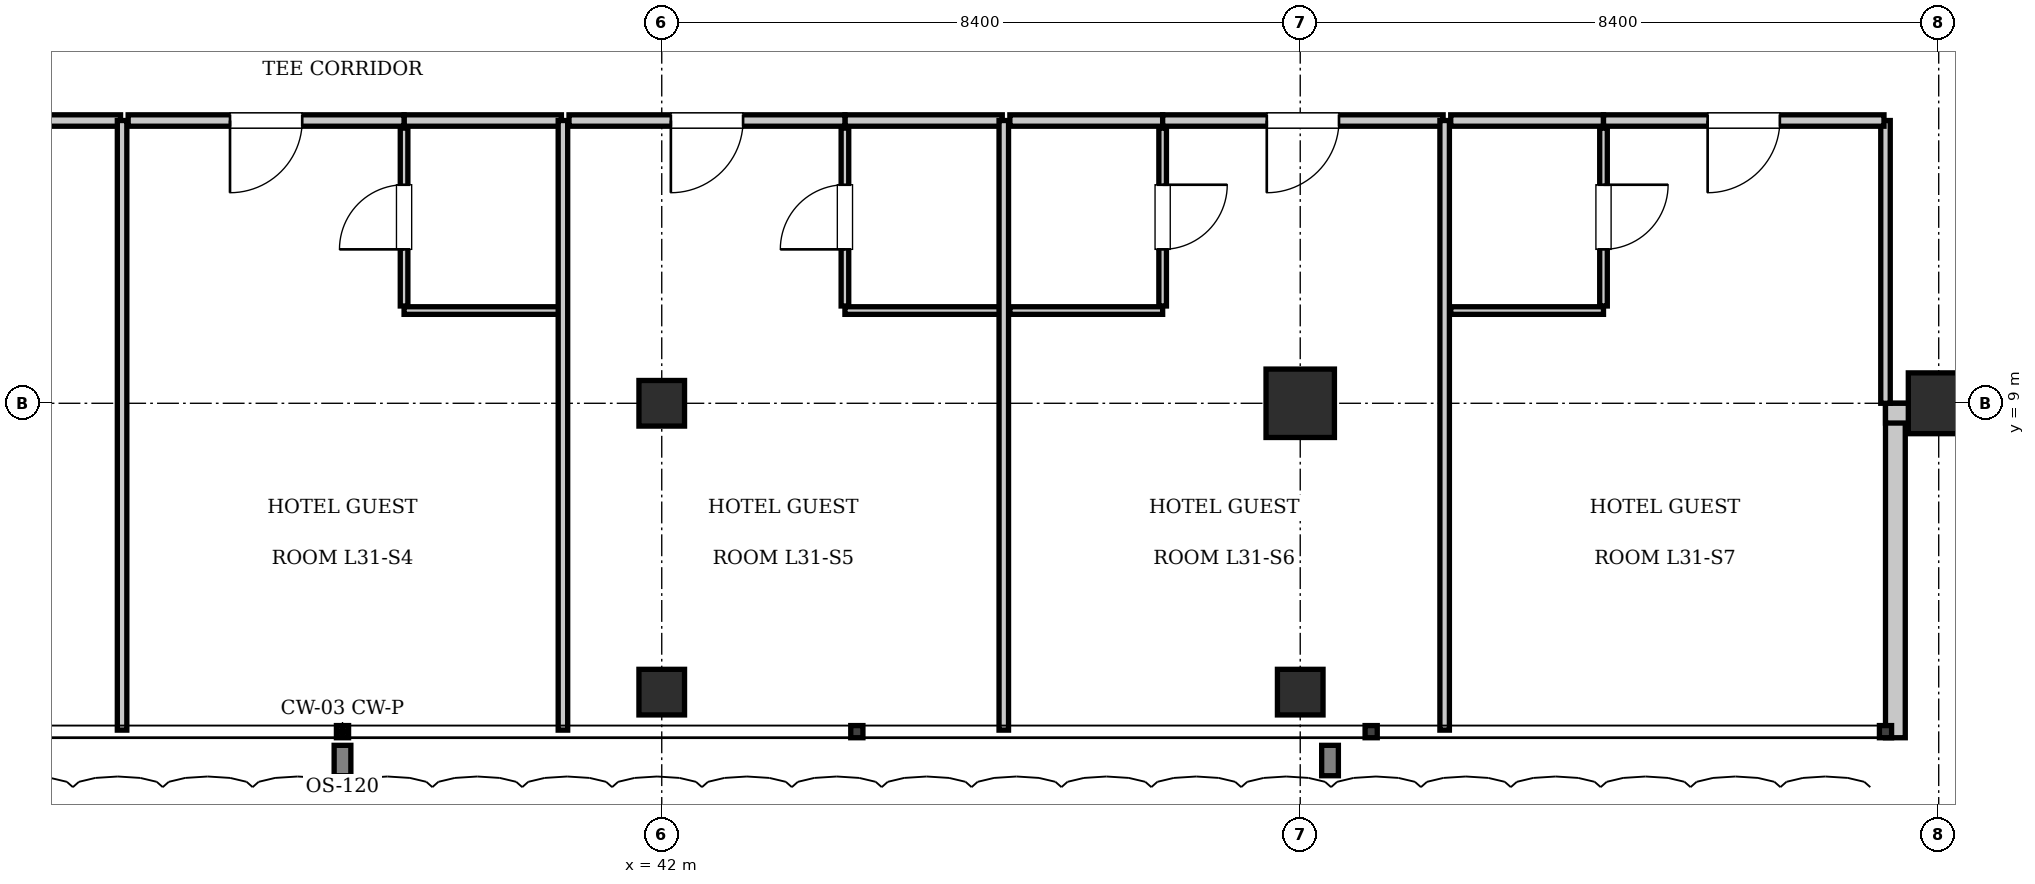
"""IFC4 building model, lengths in metres.
Left out: names, types, materials, properties, quantities, classifications, styles, units other than length and angle.
Written with IfcOpenShell. Run it as: python <this file> out.ifc"""

import sys

from ifc_helpers import new_model, si_unit, direction, frame, frame_2d, origin, origin_2d, place, context, subcontext, project, spatial, rectangle, i_section, extrude, element, fill, save


model = new_model("IFC4")
c1 = context("Model", 3, precision=1e-05, world=origin(), true_north=direction((0.0, 1.0)))
c2 = subcontext(c1, "Body", "Model", "MODEL_VIEW")
j1 = project(units=[si_unit("LENGTHUNIT", "METRE"), si_unit("PLANEANGLEUNIT", "RADIAN")], contexts=[c1])
p1 = place(None, origin())
s1 = spatial("IfcSite", under=j1, at=p1, CompositionType="ELEMENT")
p2 = place(p1, origin())
s2 = spatial("IfcBuilding", under=s1, at=p2, CompositionType="ELEMENT")
p3 = place(p2, frame((0.0, 0.0, 131.25)))
s3 = spatial("IfcBuildingStorey", under=s2, at=p3, CompositionType="ELEMENT", Elevation=131.25)
p4 = place(p3, frame((50.4, 9.0, 0.0), z_axis=(0.0, 0.0, 1.0), x_axis=(1.0, 0.0, 0.0)))
e1 = element("IfcColumn", 1, at=p4, inside=s3, PredefinedType="COLUMN", context=c2, shape_type="SweptSolid", body=[
    extrude(rectangle(XDim=0.9, YDim=0.9, at=origin_2d()), origin(), (0.0, 0.0, 1.0), 3.85),
])
p5 = place(p3, frame((42.0, 9.0, 0.0), z_axis=(0.0, 0.0, 1.0), x_axis=(1.0, 0.0, 0.0)))
e2 = element("IfcColumn", 2, at=p5, inside=s3, PredefinedType="COLUMN", context=c2, shape_type="SweptSolid", body=[
    extrude(i_section(OverallWidth=0.6, OverallDepth=0.6, WebThickness=0.025, FlangeThickness=0.038, at=origin_2d()), origin(), (0.0, 0.0, 1.0), 3.85),
])
p6 = place(p3, frame((58.8, 9.0, 0.0), z_axis=(0.0, 0.0, 1.0), x_axis=(1.0, 0.0, 0.0)))
e3 = element("IfcColumn", 3, at=p6, inside=s3, PredefinedType="COLUMN", context=c2, shape_type="SweptSolid", body=[
    extrude(rectangle(XDim=0.8, YDim=0.8, at=origin_2d()), origin(), (0.0, 0.0, 1.0), 3.85),
])
for number, where, z_axis, x_axis in (
    (4, (42.0, 5.2, 0.0), (0.0, 0.0, 1.0), (1.0, 0.0, 0.0)),
    (5, (50.4, 5.2, 0.0), (0.0, 0.0, 1.0), (1.0, 0.0, 0.0)),
):
    element("IfcColumn", number, at=place(p3, frame(where, z_axis=z_axis, x_axis=x_axis)), inside=s3, PredefinedType="COLUMN", context=c2, shape_type="SweptSolid", body=[
        extrude(i_section(OverallWidth=0.6, OverallDepth=0.6, WebThickness=0.025, FlangeThickness=0.038, at=origin_2d()), origin(), (0.0, 0.0, 1.0), 3.85),
    ])
p7 = place(p3, frame((58.23, 9.0, 0.0), z_axis=(0.0, 0.0, 1.0), x_axis=(0.0, -1.0, 0.0)))
e6 = element("IfcWall", 6, at=p7, inside=s3, PredefinedType="SOLIDWALL", context=c2, shape_type="SweptSolid", body=[
    extrude(rectangle(XDim=4.4, YDim=0.26, at=frame_2d((2.2, 0.0))), origin(), (0.0, 0.0, 1.0), 3.61),
])
p8 = place(p3, frame((62.5, 8.87, 0.0), z_axis=(0.0, 0.0, 1.0), x_axis=(-1.0, 0.0, 0.0)))
e7 = element("IfcWall", 7, at=p8, inside=s3, PredefinedType="SOLIDWALL", context=c2, shape_type="SweptSolid", body=[
    extrude(rectangle(XDim=4.4, YDim=0.26, at=frame_2d((2.2, 0.0))), origin(), (0.0, 0.0, 1.0), 2.998),
])
p9 = place(p3, frame((58.1, 9.0, 0.0), z_axis=(0.0, 0.0, 1.0), x_axis=(0.0, 1.0, 0.0)))
e8 = element("IfcWall", 8, at=p9, inside=s3, PredefinedType="PARTITIONING", context=c2, shape_type="SweptSolid", body=[
    extrude(rectangle(XDim=3.72, YDim=0.125, at=frame_2d((1.86, 0.0))), origin(), (0.0, 0.0, 1.0), 3.61),
])
p10 = place(p3, frame((31.19, 12.72, 0.0), z_axis=(0.0, 0.0, 1.0), x_axis=(1.0, 0.0, 0.0)))
e9 = element("IfcWall", 9, at=p10, inside=s3, PredefinedType="PARTITIONING", context=c2, shape_type="SweptSolid", body=[
    extrude(rectangle(XDim=3.69, YDim=0.15, at=frame_2d((1.845, 0.0))), origin(), (0.0, 0.0, 1.0), 3.61),
])
p11 = place(p10, frame((1.37, 0.0, 0.0)))
e10 = element("IfcOpeningElement", 10, at=p11, cuts=e9, PredefinedType="OPENING", context=c2, shape_type="SweptSolid", body=[
    extrude(rectangle(XDim=0.95, YDim=2.15, at=frame_2d((0.475, 1.075))), frame((0.0, 0.085, 0.0), z_axis=(0.0, -1.0, 0.0), x_axis=(1.0, 0.0, 0.0)), (0.0, 0.0, 1.0), 0.17),
])
p12 = place(p3, frame((34.9, 4.7, 0.0), z_axis=(0.0, 0.0, 1.0), x_axis=(0.0, 1.0, 0.0)))
e11 = element("IfcWall", 11, at=p12, inside=s3, PredefinedType="PARTITIONING", context=c2, shape_type="SweptSolid", body=[
    extrude(rectangle(XDim=8.02, YDim=0.125, at=frame_2d((4.01, 0.0))), origin(), (0.0, 0.0, 1.0), 3.61),
])
p13 = place(p3, frame((38.61, 12.72, 0.0), z_axis=(0.0, 0.0, 1.0), x_axis=(1.0, 0.0, 0.0)))
e12 = element("IfcWall", 12, at=p13, inside=s3, PredefinedType="PARTITIONING", context=c2, shape_type="SweptSolid", body=[
    extrude(rectangle(XDim=2.07, YDim=0.15, at=frame_2d((1.035, 0.0))), origin(), (0.0, 0.0, 1.0), 3.61),
])
p14 = place(p3, frame((38.61, 10.22, 0.0), z_axis=(0.0, 0.0, 1.0), x_axis=(1.0, 0.0, 0.0)))
e13 = element("IfcWall", 13, at=p14, inside=s3, PredefinedType="PARTITIONING", context=c2, shape_type="SweptSolid", body=[
    extrude(rectangle(XDim=2.05, YDim=0.1, at=frame_2d((1.025, 0.0))), origin(), (0.0, 0.0, 1.0), 3.61),
])
p15 = place(p3, frame((38.61, 10.28, 0.0), z_axis=(0.0, 0.0, 1.0), x_axis=(0.0, 1.0, 0.0)))
e14 = element("IfcWall", 14, at=p15, inside=s3, PredefinedType="PARTITIONING", context=c2, shape_type="SweptSolid", body=[
    extrude(rectangle(XDim=2.34, YDim=0.1, at=frame_2d((1.17, 0.0))), origin(), (0.0, 0.0, 1.0), 3.61),
])
p16 = place(p15, frame((0.745, 0.0, 0.0)))
e15 = element("IfcOpeningElement", 15, at=p16, cuts=e14, PredefinedType="OPENING", context=c2, shape_type="SweptSolid", body=[
    extrude(rectangle(XDim=0.85, YDim=2.1, at=frame_2d((0.425, 1.05))), frame((0.0, 0.06, 0.0), z_axis=(0.0, -1.0, 0.0), x_axis=(1.0, 0.0, 0.0)), (0.0, 0.0, 1.0), 0.12),
])
p17 = place(p3, frame((34.98, 12.72, 0.0), z_axis=(0.0, 0.0, 1.0), x_axis=(1.0, 0.0, 0.0)))
e16 = element("IfcWall", 16, at=p17, inside=s3, PredefinedType="PARTITIONING", context=c2, shape_type="SweptSolid", body=[
    extrude(rectangle(XDim=3.63, YDim=0.15, at=frame_2d((1.815, 0.0))), origin(), (0.0, 0.0, 1.0), 3.61),
])
p18 = place(p17, frame((1.34, 0.0, 0.0)))
e17 = element("IfcOpeningElement", 17, at=p18, cuts=e16, PredefinedType="OPENING", context=c2, shape_type="SweptSolid", body=[
    extrude(rectangle(XDim=0.95, YDim=2.15, at=frame_2d((0.475, 1.075))), frame((0.0, 0.085, 0.0), z_axis=(0.0, -1.0, 0.0), x_axis=(1.0, 0.0, 0.0)), (0.0, 0.0, 1.0), 0.17),
])
p19 = place(p3, frame((40.7, 4.7, 0.0), z_axis=(0.0, 0.0, 1.0), x_axis=(0.0, 1.0, 0.0)))
e18 = element("IfcWall", 18, at=p19, inside=s3, PredefinedType="PARTITIONING", context=c2, shape_type="SweptSolid", body=[
    extrude(rectangle(XDim=8.02, YDim=0.125, at=frame_2d((4.01, 0.0))), origin(), (0.0, 0.0, 1.0), 3.61),
])
p20 = place(p3, frame((44.41, 12.72, 0.0), z_axis=(0.0, 0.0, 1.0), x_axis=(1.0, 0.0, 0.0)))
e19 = element("IfcWall", 19, at=p20, inside=s3, PredefinedType="PARTITIONING", context=c2, shape_type="SweptSolid", body=[
    extrude(rectangle(XDim=2.07, YDim=0.15, at=frame_2d((1.035, 0.0))), origin(), (0.0, 0.0, 1.0), 3.61),
])
p21 = place(p3, frame((44.41, 10.22, 0.0), z_axis=(0.0, 0.0, 1.0), x_axis=(1.0, 0.0, 0.0)))
e20 = element("IfcWall", 20, at=p21, inside=s3, PredefinedType="PARTITIONING", context=c2, shape_type="SweptSolid", body=[
    extrude(rectangle(XDim=2.05, YDim=0.1, at=frame_2d((1.025, 0.0))), origin(), (0.0, 0.0, 1.0), 3.61),
])
p22 = place(p3, frame((44.41, 10.28, 0.0), z_axis=(0.0, 0.0, 1.0), x_axis=(0.0, 1.0, 0.0)))
e21 = element("IfcWall", 21, at=p22, inside=s3, PredefinedType="PARTITIONING", context=c2, shape_type="SweptSolid", body=[
    extrude(rectangle(XDim=2.34, YDim=0.1, at=frame_2d((1.17, 0.0))), origin(), (0.0, 0.0, 1.0), 3.61),
])
p23 = place(p22, frame((0.745, 0.0, 0.0)))
e22 = element("IfcOpeningElement", 22, at=p23, cuts=e21, PredefinedType="OPENING", context=c2, shape_type="SweptSolid", body=[
    extrude(rectangle(XDim=0.85, YDim=2.1, at=frame_2d((0.425, 1.05))), frame((0.0, 0.06, 0.0), z_axis=(0.0, -1.0, 0.0), x_axis=(1.0, 0.0, 0.0)), (0.0, 0.0, 1.0), 0.12),
])
p24 = place(p3, frame((40.78, 12.72, 0.0), z_axis=(0.0, 0.0, 1.0), x_axis=(1.0, 0.0, 0.0)))
e23 = element("IfcWall", 23, at=p24, inside=s3, PredefinedType="PARTITIONING", context=c2, shape_type="SweptSolid", body=[
    extrude(rectangle(XDim=3.63, YDim=0.15, at=frame_2d((1.815, 0.0))), origin(), (0.0, 0.0, 1.0), 3.61),
])
p25 = place(p24, frame((1.34, 0.0, 0.0)))
e24 = element("IfcOpeningElement", 24, at=p25, cuts=e23, PredefinedType="OPENING", context=c2, shape_type="SweptSolid", body=[
    extrude(rectangle(XDim=0.95, YDim=2.15, at=frame_2d((0.475, 1.075))), frame((0.0, 0.085, 0.0), z_axis=(0.0, -1.0, 0.0), x_axis=(1.0, 0.0, 0.0)), (0.0, 0.0, 1.0), 0.17),
])
p26 = place(p3, frame((46.5, 4.7, 0.0), z_axis=(0.0, 0.0, 1.0), x_axis=(0.0, 1.0, 0.0)))
e25 = element("IfcWall", 25, at=p26, inside=s3, PredefinedType="PARTITIONING", context=c2, shape_type="SweptSolid", body=[
    extrude(rectangle(XDim=8.02, YDim=0.125, at=frame_2d((4.01, 0.0))), origin(), (0.0, 0.0, 1.0), 3.61),
])
p27 = place(p3, frame((46.58, 12.72, 0.0), z_axis=(0.0, 0.0, 1.0), x_axis=(1.0, 0.0, 0.0)))
e26 = element("IfcWall", 26, at=p27, inside=s3, PredefinedType="PARTITIONING", context=c2, shape_type="SweptSolid", body=[
    extrude(rectangle(XDim=2.01, YDim=0.15, at=frame_2d((1.005, 0.0))), origin(), (0.0, 0.0, 1.0), 3.61),
])
p28 = place(p3, frame((46.58, 10.22, 0.0), z_axis=(0.0, 0.0, 1.0), x_axis=(1.0, 0.0, 0.0)))
e27 = element("IfcWall", 27, at=p28, inside=s3, PredefinedType="PARTITIONING", context=c2, shape_type="SweptSolid", body=[
    extrude(rectangle(XDim=2.01, YDim=0.1, at=frame_2d((1.005, 0.0))), origin(), (0.0, 0.0, 1.0), 3.61),
])
p29 = place(p3, frame((48.59, 10.28, 0.0), z_axis=(0.0, 0.0, 1.0), x_axis=(0.0, 1.0, 0.0)))
e28 = element("IfcWall", 28, at=p29, inside=s3, PredefinedType="PARTITIONING", context=c2, shape_type="SweptSolid", body=[
    extrude(rectangle(XDim=2.34, YDim=0.1, at=frame_2d((1.17, 0.0))), origin(), (0.0, 0.0, 1.0), 3.61),
])
p30 = place(p29, frame((0.745, 0.0, 0.0)))
e29 = element("IfcOpeningElement", 29, at=p30, cuts=e28, PredefinedType="OPENING", context=c2, shape_type="SweptSolid", body=[
    extrude(rectangle(XDim=0.85, YDim=2.1, at=frame_2d((0.425, 1.05))), frame((0.0, 0.06, 0.0), z_axis=(0.0, -1.0, 0.0), x_axis=(1.0, 0.0, 0.0)), (0.0, 0.0, 1.0), 0.12),
])
p31 = place(p3, frame((48.59, 12.72, 0.0), z_axis=(0.0, 0.0, 1.0), x_axis=(1.0, 0.0, 0.0)))
e30 = element("IfcWall", 30, at=p31, inside=s3, PredefinedType="PARTITIONING", context=c2, shape_type="SweptSolid", body=[
    extrude(rectangle(XDim=3.69, YDim=0.15, at=frame_2d((1.845, 0.0))), origin(), (0.0, 0.0, 1.0), 3.61),
])
p32 = place(p31, frame((1.37, 0.0, 0.0)))
e31 = element("IfcOpeningElement", 31, at=p32, cuts=e30, PredefinedType="OPENING", context=c2, shape_type="SweptSolid", body=[
    extrude(rectangle(XDim=0.95, YDim=2.15, at=frame_2d((0.475, 1.075))), frame((0.0, 0.085, 0.0), z_axis=(0.0, -1.0, 0.0), x_axis=(1.0, 0.0, 0.0)), (0.0, 0.0, 1.0), 0.17),
])
p33 = place(p3, frame((52.3, 4.7, 0.0), z_axis=(0.0, 0.0, 1.0), x_axis=(0.0, 1.0, 0.0)))
e32 = element("IfcWall", 32, at=p33, inside=s3, PredefinedType="PARTITIONING", context=c2, shape_type="SweptSolid", body=[
    extrude(rectangle(XDim=8.02, YDim=0.125, at=frame_2d((4.01, 0.0))), origin(), (0.0, 0.0, 1.0), 3.61),
])
p34 = place(p3, frame((52.38, 12.72, 0.0), z_axis=(0.0, 0.0, 1.0), x_axis=(1.0, 0.0, 0.0)))
e33 = element("IfcWall", 33, at=p34, inside=s3, PredefinedType="PARTITIONING", context=c2, shape_type="SweptSolid", body=[
    extrude(rectangle(XDim=2.01, YDim=0.15, at=frame_2d((1.005, 0.0))), origin(), (0.0, 0.0, 1.0), 3.61),
])
p35 = place(p3, frame((52.38, 10.22, 0.0), z_axis=(0.0, 0.0, 1.0), x_axis=(1.0, 0.0, 0.0)))
e34 = element("IfcWall", 34, at=p35, inside=s3, PredefinedType="PARTITIONING", context=c2, shape_type="SweptSolid", body=[
    extrude(rectangle(XDim=2.01, YDim=0.1, at=frame_2d((1.005, 0.0))), origin(), (0.0, 0.0, 1.0), 3.61),
])
p36 = place(p3, frame((54.39, 10.28, 0.0), z_axis=(0.0, 0.0, 1.0), x_axis=(0.0, 1.0, 0.0)))
e35 = element("IfcWall", 35, at=p36, inside=s3, PredefinedType="PARTITIONING", context=c2, shape_type="SweptSolid", body=[
    extrude(rectangle(XDim=2.34, YDim=0.1, at=frame_2d((1.17, 0.0))), origin(), (0.0, 0.0, 1.0), 3.61),
])
p37 = place(p36, frame((0.745, 0.0, 0.0)))
e36 = element("IfcOpeningElement", 36, at=p37, cuts=e35, PredefinedType="OPENING", context=c2, shape_type="SweptSolid", body=[
    extrude(rectangle(XDim=0.85, YDim=2.1, at=frame_2d((0.425, 1.05))), frame((0.0, 0.06, 0.0), z_axis=(0.0, -1.0, 0.0), x_axis=(1.0, 0.0, 0.0)), (0.0, 0.0, 1.0), 0.12),
])
p38 = place(p3, frame((54.39, 12.72, 0.0), z_axis=(0.0, 0.0, 1.0), x_axis=(1.0, 0.0, 0.0)))
e37 = element("IfcWall", 37, at=p38, inside=s3, PredefinedType="PARTITIONING", context=c2, shape_type="SweptSolid", body=[
    extrude(rectangle(XDim=3.69, YDim=0.15, at=frame_2d((1.845, 0.0))), origin(), (0.0, 0.0, 1.0), 3.61),
])
p39 = place(p38, frame((1.37, 0.0, 0.0)))
e38 = element("IfcOpeningElement", 38, at=p39, cuts=e37, PredefinedType="OPENING", context=c2, shape_type="SweptSolid", body=[
    extrude(rectangle(XDim=0.95, YDim=2.15, at=frame_2d((0.475, 1.075))), frame((0.0, 0.085, 0.0), z_axis=(0.0, -1.0, 0.0), x_axis=(1.0, 0.0, 0.0)), (0.0, 0.0, 1.0), 0.17),
])
p40 = place(p16, origin())
e39 = element("IfcDoor", 39, at=p40, inside=s3, OperationType="SINGLE_SWING_LEFT", PredefinedType="DOOR", context=c2, shape_type="SweptSolid", body=[
    extrude(rectangle(XDim=0.85, YDim=2.1, at=frame_2d((0.425, 1.05))), frame((0.0, 0.025, 0.0), z_axis=(0.0, -1.0, 0.0), x_axis=(1.0, 0.0, 0.0)), (0.0, 0.0, 1.0), 0.05),
])
fill(e15, e39)
p41 = place(p18, frame((0.95, 0.0, 0.0), z_axis=(0.0, 0.0, 1.0), x_axis=(-1.0, 0.0, 0.0)))
e40 = element("IfcDoor", 40, at=p41, inside=s3, OperationType="SINGLE_SWING_RIGHT", PredefinedType="DOOR", context=c2, shape_type="SweptSolid", body=[
    extrude(rectangle(XDim=0.95, YDim=2.15, at=frame_2d((0.475, 1.075))), frame((0.0, 0.025, 0.0), z_axis=(0.0, -1.0, 0.0), x_axis=(1.0, 0.0, 0.0)), (0.0, 0.0, 1.0), 0.05),
])
fill(e17, e40)
p42 = place(p23, origin())
e41 = element("IfcDoor", 41, at=p42, inside=s3, OperationType="SINGLE_SWING_LEFT", PredefinedType="DOOR", context=c2, shape_type="SweptSolid", body=[
    extrude(rectangle(XDim=0.85, YDim=2.1, at=frame_2d((0.425, 1.05))), frame((0.0, 0.025, 0.0), z_axis=(0.0, -1.0, 0.0), x_axis=(1.0, 0.0, 0.0)), (0.0, 0.0, 1.0), 0.05),
])
fill(e22, e41)
p43 = place(p25, frame((0.95, 0.0, 0.0), z_axis=(0.0, 0.0, 1.0), x_axis=(-1.0, 0.0, 0.0)))
e42 = element("IfcDoor", 42, at=p43, inside=s3, OperationType="SINGLE_SWING_RIGHT", PredefinedType="DOOR", context=c2, shape_type="SweptSolid", body=[
    extrude(rectangle(XDim=0.95, YDim=2.15, at=frame_2d((0.475, 1.075))), frame((0.0, 0.025, 0.0), z_axis=(0.0, -1.0, 0.0), x_axis=(1.0, 0.0, 0.0)), (0.0, 0.0, 1.0), 0.05),
])
fill(e24, e42)
p44 = place(p30, frame((0.85, 0.0, 0.0), z_axis=(0.0, 0.0, 1.0), x_axis=(-1.0, 0.0, 0.0)))
e43 = element("IfcDoor", 43, at=p44, inside=s3, OperationType="SINGLE_SWING_LEFT", PredefinedType="DOOR", context=c2, shape_type="SweptSolid", body=[
    extrude(rectangle(XDim=0.85, YDim=2.1, at=frame_2d((0.425, 1.05))), frame((0.0, 0.025, 0.0), z_axis=(0.0, -1.0, 0.0), x_axis=(1.0, 0.0, 0.0)), (0.0, 0.0, 1.0), 0.05),
])
fill(e29, e43)
p45 = place(p32, frame((0.95, 0.0, 0.0), z_axis=(0.0, 0.0, 1.0), x_axis=(-1.0, 0.0, 0.0)))
e44 = element("IfcDoor", 44, at=p45, inside=s3, OperationType="SINGLE_SWING_RIGHT", PredefinedType="DOOR", context=c2, shape_type="SweptSolid", body=[
    extrude(rectangle(XDim=0.95, YDim=2.15, at=frame_2d((0.475, 1.075))), frame((0.0, 0.025, 0.0), z_axis=(0.0, -1.0, 0.0), x_axis=(1.0, 0.0, 0.0)), (0.0, 0.0, 1.0), 0.05),
])
fill(e31, e44)
p46 = place(p37, frame((0.85, 0.0, 0.0), z_axis=(0.0, 0.0, 1.0), x_axis=(-1.0, 0.0, 0.0)))
e45 = element("IfcDoor", 45, at=p46, inside=s3, OperationType="SINGLE_SWING_LEFT", PredefinedType="DOOR", context=c2, shape_type="SweptSolid", body=[
    extrude(rectangle(XDim=0.85, YDim=2.1, at=frame_2d((0.425, 1.05))), frame((0.0, 0.025, 0.0), z_axis=(0.0, -1.0, 0.0), x_axis=(1.0, 0.0, 0.0)), (0.0, 0.0, 1.0), 0.05),
])
fill(e36, e45)
p47 = place(p39, frame((0.95, 0.0, 0.0), z_axis=(0.0, 0.0, 1.0), x_axis=(-1.0, 0.0, 0.0)))
e46 = element("IfcDoor", 46, at=p47, inside=s3, OperationType="SINGLE_SWING_RIGHT", PredefinedType="DOOR", context=c2, shape_type="SweptSolid", body=[
    extrude(rectangle(XDim=0.95, YDim=2.15, at=frame_2d((0.475, 1.075))), frame((0.0, 0.025, 0.0), z_axis=(0.0, -1.0, 0.0), x_axis=(1.0, 0.0, 0.0)), (0.0, 0.0, 1.0), 0.05),
])
fill(e38, e46)
save(model, sys.argv[1])
